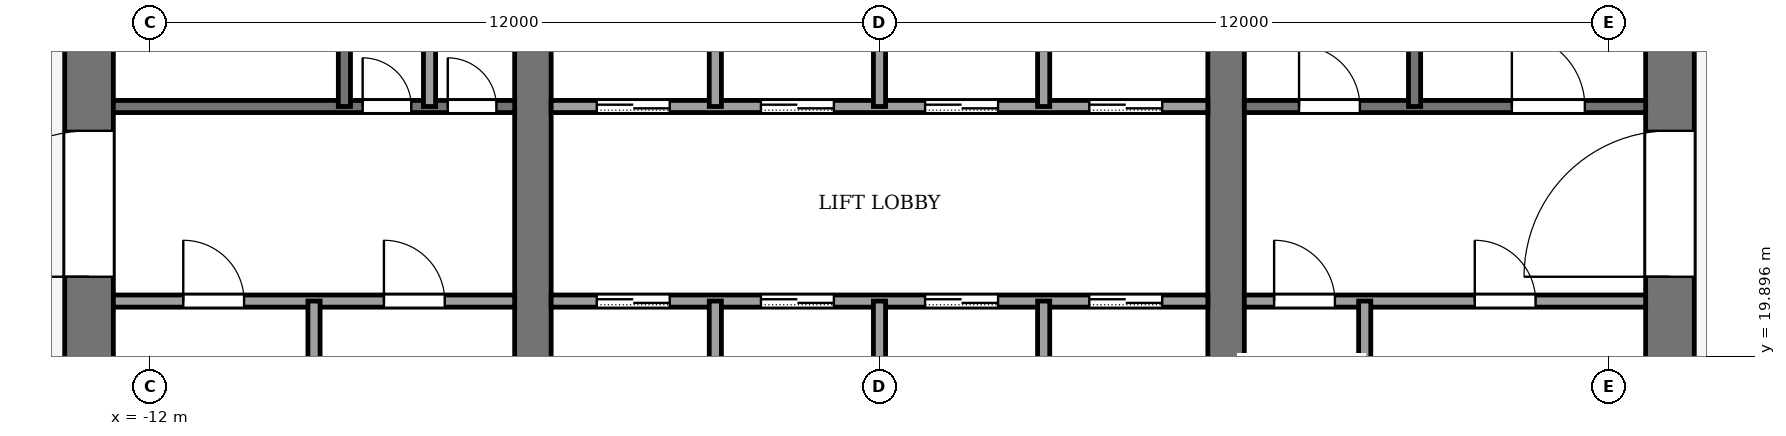
"""IFC4 building model, lengths in metres.
Left out: names, types, materials, properties, quantities, classifications, styles, units other than length and angle.
Written with IfcOpenShell. Run it as: python <this file> out.ifc"""

import sys

from ifc_helpers import new_model, si_unit, direction, frame, frame_2d, origin, place, context, subcontext, project, spatial, rectangle, extrude, element, fill, save


model = new_model("IFC4")
c1 = context("Model", 3, precision=1e-05, world=origin(), true_north=direction((0.0, 1.0)))
c2 = subcontext(c1, "Body", "Model", "MODEL_VIEW")
j1 = project(units=[si_unit("LENGTHUNIT", "METRE"), si_unit("PLANEANGLEUNIT", "RADIAN")], contexts=[c1])
p1 = place(None, origin())
s1 = spatial("IfcSite", under=j1, at=p1, CompositionType="ELEMENT")
p2 = place(p1, origin())
s2 = spatial("IfcBuilding", under=s1, at=p2, CompositionType="ELEMENT")
p3 = place(p2, frame((0.0, 0.0, 242.0)))
s3 = spatial("IfcBuildingStorey", under=s2, at=p3, CompositionType="ELEMENT", Elevation=242.0)
p4 = place(p3, frame((-13.0, 18.4, -0.13), z_axis=(0.0, 0.0, 1.0), x_axis=(0.0, 1.0, 0.0)))
e1 = element("IfcWall", 1, at=p4, inside=s3, PredefinedType="SHEAR", context=c2, shape_type="SweptSolid", body=[
    extrude(rectangle(XDim=19.2, YDim=0.8, at=frame_2d((9.6, 0.0))), origin(), (0.0, 0.0, 1.0), 4.0),
])
p5 = place(p4, frame((2.8, 0.0, 0.13)))
e2 = element("IfcOpeningElement", 2, at=p5, cuts=e1, PredefinedType="OPENING", context=c2, shape_type="SweptSolid", body=[
    extrude(rectangle(XDim=2.4, YDim=2.4, at=frame_2d((1.2, 1.2))), frame((0.0, 0.41, 0.0), z_axis=(0.0, -1.0, 0.0), x_axis=(1.0, 0.0, 0.0)), (0.0, 0.0, 1.0), 0.82),
])
p6 = place(p4, frame((13.4, 0.0, 0.13)))
e3 = element("IfcOpeningElement", 3, at=p6, cuts=e1, PredefinedType="OPENING", context=c2, shape_type="SweptSolid", body=[
    extrude(rectangle(XDim=1.4, YDim=2.2, at=frame_2d((0.7, 1.1))), frame((0.0, 0.41, 0.0), z_axis=(0.0, -1.0, 0.0), x_axis=(1.0, 0.0, 0.0)), (0.0, 0.0, 1.0), 0.82),
])
p7 = place(p3, frame((13.0, 18.4, -0.13), z_axis=(0.0, 0.0, 1.0), x_axis=(0.0, 1.0, 0.0)))
e4 = element("IfcWall", 4, at=p7, inside=s3, PredefinedType="SHEAR", context=c2, shape_type="SweptSolid", body=[
    extrude(rectangle(XDim=19.2, YDim=0.8, at=frame_2d((9.6, 0.0))), origin(), (0.0, 0.0, 1.0), 4.0),
])
p8 = place(p7, frame((2.8, 0.0, 0.13)))
e5 = element("IfcOpeningElement", 5, at=p8, cuts=e4, PredefinedType="OPENING", context=c2, shape_type="SweptSolid", body=[
    extrude(rectangle(XDim=2.4, YDim=2.4, at=frame_2d((1.2, 1.2))), frame((0.0, 0.41, 0.0), z_axis=(0.0, -1.0, 0.0), x_axis=(1.0, 0.0, 0.0)), (0.0, 0.0, 1.0), 0.82),
])
p9 = place(p7, frame((13.3, 0.0, 0.13)))
e6 = element("IfcOpeningElement", 6, at=p9, cuts=e4, PredefinedType="OPENING", context=c2, shape_type="SweptSolid", body=[
    extrude(rectangle(XDim=2.4, YDim=2.4, at=frame_2d((1.2, 1.2))), frame((0.0, 0.41, 0.0), z_axis=(0.0, -1.0, 0.0), x_axis=(1.0, 0.0, 0.0)), (0.0, 0.0, 1.0), 0.82),
])
p10 = place(p3, frame((-5.7, 18.4, -0.13), z_axis=(0.0, 0.0, 1.0), x_axis=(0.0, 1.0, 0.0)))
e7 = element("IfcWall", 7, at=p10, inside=s3, PredefinedType="SHEAR", context=c2, shape_type="SweptSolid", body=[
    extrude(rectangle(XDim=19.2, YDim=0.6, at=frame_2d((9.6, 0.0))), origin(), (0.0, 0.0, 1.0), 4.0),
])
p11 = place(p10, frame((8.35, 0.0, 0.13)))
e8 = element("IfcOpeningElement", 8, at=p11, cuts=e7, PredefinedType="OPENING", context=c2, shape_type="SweptSolid", body=[
    extrude(rectangle(XDim=0.9, YDim=2.1, at=frame_2d((0.45, 1.05))), frame((0.0, 0.31, 0.0), z_axis=(0.0, -1.0, 0.0), x_axis=(1.0, 0.0, 0.0)), (0.0, 0.0, 1.0), 0.62),
])
p12 = place(p3, frame((5.7, 18.4, -0.13), z_axis=(0.0, 0.0, 1.0), x_axis=(0.0, 1.0, 0.0)))
e9 = element("IfcWall", 9, at=p12, inside=s3, PredefinedType="SHEAR", context=c2, shape_type="SweptSolid", body=[
    extrude(rectangle(XDim=19.2, YDim=0.6, at=frame_2d((9.6, 0.0))), origin(), (0.0, 0.0, 1.0), 4.0),
])
p13 = place(p12, frame((8.35, 0.0, 0.13)))
e10 = element("IfcOpeningElement", 10, at=p13, cuts=e9, PredefinedType="OPENING", context=c2, shape_type="SweptSolid", body=[
    extrude(rectangle(XDim=0.9, YDim=2.1, at=frame_2d((0.45, 1.05))), frame((0.0, 0.31, 0.0), z_axis=(0.0, -1.0, 0.0), x_axis=(1.0, 0.0, 0.0)), (0.0, 0.0, 1.0), 0.62),
])
p14 = place(p12, frame((13.3, 0.0, 0.13)))
e11 = element("IfcOpeningElement", 11, at=p14, cuts=e9, PredefinedType="OPENING", context=c2, shape_type="SweptSolid", body=[
    extrude(rectangle(XDim=2.4, YDim=2.4, at=frame_2d((1.2, 1.2))), frame((0.0, 0.31, 0.0), z_axis=(0.0, -1.0, 0.0), x_axis=(1.0, 0.0, 0.0)), (0.0, 0.0, 1.0), 0.62),
])
p15 = place(p3, frame((-12.6, 20.8, 0.0), z_axis=(0.0, 0.0, 1.0), x_axis=(1.0, 0.0, 0.0)))
e12 = element("IfcWall", 12, at=p15, inside=s3, PredefinedType="PARTITIONING", context=c2, shape_type="SweptSolid", body=[
    extrude(rectangle(XDim=6.6, YDim=0.2, at=frame_2d((3.3, 0.0))), origin(), (0.0, 0.0, 1.0), 3.87),
])
p16 = place(p15, frame((1.15, 0.0, 0.0)))
e13 = element("IfcOpeningElement", 13, at=p16, cuts=e12, PredefinedType="OPENING", context=c2, shape_type="SweptSolid", body=[
    extrude(rectangle(XDim=1.0, YDim=2.1, at=frame_2d((0.5, 1.05))), frame((0.0, 0.11, 0.0), z_axis=(0.0, -1.0, 0.0), x_axis=(1.0, 0.0, 0.0)), (0.0, 0.0, 1.0), 0.22),
])
p17 = place(p15, frame((4.45, 0.0, 0.0)))
e14 = element("IfcOpeningElement", 14, at=p17, cuts=e12, PredefinedType="OPENING", context=c2, shape_type="SweptSolid", body=[
    extrude(rectangle(XDim=1.0, YDim=2.1, at=frame_2d((0.5, 1.05))), frame((0.0, 0.11, 0.0), z_axis=(0.0, -1.0, 0.0), x_axis=(1.0, 0.0, 0.0)), (0.0, 0.0, 1.0), 0.22),
])
p18 = place(p3, frame((-5.4, 20.8, 0.0), z_axis=(0.0, 0.0, 1.0), x_axis=(1.0, 0.0, 0.0)))
e15 = element("IfcWall", 15, at=p18, inside=s3, PredefinedType="PARTITIONING", context=c2, shape_type="SweptSolid", body=[
    extrude(rectangle(XDim=10.8, YDim=0.2, at=frame_2d((5.4, 0.0))), origin(), (0.0, 0.0, 1.0), 3.87),
])
p19 = place(p18, frame((0.75, 0.0, 0.0)))
e16 = element("IfcOpeningElement", 16, at=p19, cuts=e15, PredefinedType="OPENING", context=c2, shape_type="SweptSolid", body=[
    extrude(rectangle(XDim=1.2, YDim=2.2, at=frame_2d((0.6, 1.1))), frame((0.0, 0.11, 0.0), z_axis=(0.0, -1.0, 0.0), x_axis=(1.0, 0.0, 0.0)), (0.0, 0.0, 1.0), 0.22),
])
p20 = place(p18, frame((3.45, 0.0, 0.0)))
e17 = element("IfcOpeningElement", 17, at=p20, cuts=e15, PredefinedType="OPENING", context=c2, shape_type="SweptSolid", body=[
    extrude(rectangle(XDim=1.2, YDim=2.2, at=frame_2d((0.6, 1.1))), frame((0.0, 0.11, 0.0), z_axis=(0.0, -1.0, 0.0), x_axis=(1.0, 0.0, 0.0)), (0.0, 0.0, 1.0), 0.22),
])
p21 = place(p18, frame((6.15, 0.0, 0.0)))
e18 = element("IfcOpeningElement", 18, at=p21, cuts=e15, PredefinedType="OPENING", context=c2, shape_type="SweptSolid", body=[
    extrude(rectangle(XDim=1.2, YDim=2.2, at=frame_2d((0.6, 1.1))), frame((0.0, 0.11, 0.0), z_axis=(0.0, -1.0, 0.0), x_axis=(1.0, 0.0, 0.0)), (0.0, 0.0, 1.0), 0.22),
])
p22 = place(p18, frame((8.85, 0.0, 0.0)))
e19 = element("IfcOpeningElement", 19, at=p22, cuts=e15, PredefinedType="OPENING", context=c2, shape_type="SweptSolid", body=[
    extrude(rectangle(XDim=1.2, YDim=2.2, at=frame_2d((0.6, 1.1))), frame((0.0, 0.11, 0.0), z_axis=(0.0, -1.0, 0.0), x_axis=(1.0, 0.0, 0.0)), (0.0, 0.0, 1.0), 0.22),
])
p23 = place(p3, frame((6.0, 20.8, 0.0), z_axis=(0.0, 0.0, 1.0), x_axis=(1.0, 0.0, 0.0)))
e20 = element("IfcWall", 20, at=p23, inside=s3, PredefinedType="PARTITIONING", context=c2, shape_type="SweptSolid", body=[
    extrude(rectangle(XDim=6.6, YDim=0.2, at=frame_2d((3.3, 0.0))), origin(), (0.0, 0.0, 1.0), 3.87),
])
p24 = place(p23, frame((0.49, 0.0, 0.0)))
e21 = element("IfcOpeningElement", 21, at=p24, cuts=e20, PredefinedType="OPENING", context=c2, shape_type="SweptSolid", body=[
    extrude(rectangle(XDim=1.0, YDim=2.1, at=frame_2d((0.5, 1.05))), frame((0.0, 0.11, 0.0), z_axis=(0.0, -1.0, 0.0), x_axis=(1.0, 0.0, 0.0)), (0.0, 0.0, 1.0), 0.22),
])
p25 = place(p23, frame((3.79, 0.0, 0.0)))
e22 = element("IfcOpeningElement", 22, at=p25, cuts=e20, PredefinedType="OPENING", context=c2, shape_type="SweptSolid", body=[
    extrude(rectangle(XDim=1.0, YDim=2.1, at=frame_2d((0.5, 1.05))), frame((0.0, 0.11, 0.0), z_axis=(0.0, -1.0, 0.0), x_axis=(1.0, 0.0, 0.0)), (0.0, 0.0, 1.0), 0.22),
])
p26 = place(p3, frame((-12.6, 24.0, 0.0), z_axis=(0.0, 0.0, 1.0), x_axis=(1.0, 0.0, 0.0)))
e23 = element("IfcWall", 23, at=p26, inside=s3, PredefinedType="PARTITIONING", context=c2, shape_type="SweptSolid", body=[
    extrude(rectangle(XDim=6.6, YDim=0.2, at=frame_2d((3.3, 0.0))), origin(), (0.0, 0.0, 1.0), 3.87),
])
p27 = place(p26, frame((4.1, 0.0, 0.0)))
e24 = element("IfcOpeningElement", 24, at=p27, cuts=e23, PredefinedType="OPENING", context=c2, shape_type="SweptSolid", body=[
    extrude(rectangle(XDim=0.8, YDim=2.1, at=frame_2d((0.4, 1.05))), frame((0.0, 0.11, 0.0), z_axis=(0.0, -1.0, 0.0), x_axis=(1.0, 0.0, 0.0)), (0.0, 0.0, 1.0), 0.22),
])
p28 = place(p26, frame((5.5, 0.0, 0.0)))
e25 = element("IfcOpeningElement", 25, at=p28, cuts=e23, PredefinedType="OPENING", context=c2, shape_type="SweptSolid", body=[
    extrude(rectangle(XDim=0.8, YDim=2.1, at=frame_2d((0.4, 1.05))), frame((0.0, 0.11, 0.0), z_axis=(0.0, -1.0, 0.0), x_axis=(1.0, 0.0, 0.0)), (0.0, 0.0, 1.0), 0.22),
])
p29 = place(p3, frame((-5.4, 24.0, 0.0), z_axis=(0.0, 0.0, 1.0), x_axis=(1.0, 0.0, 0.0)))
e26 = element("IfcWall", 26, at=p29, inside=s3, PredefinedType="PARTITIONING", context=c2, shape_type="SweptSolid", body=[
    extrude(rectangle(XDim=10.8, YDim=0.2, at=frame_2d((5.4, 0.0))), origin(), (0.0, 0.0, 1.0), 3.87),
])
p30 = place(p29, frame((0.75, 0.0, 0.0)))
e27 = element("IfcOpeningElement", 27, at=p30, cuts=e26, PredefinedType="OPENING", context=c2, shape_type="SweptSolid", body=[
    extrude(rectangle(XDim=1.2, YDim=2.2, at=frame_2d((0.6, 1.1))), frame((0.0, 0.11, 0.0), z_axis=(0.0, -1.0, 0.0), x_axis=(1.0, 0.0, 0.0)), (0.0, 0.0, 1.0), 0.22),
])
p31 = place(p29, frame((3.45, 0.0, 0.0)))
e28 = element("IfcOpeningElement", 28, at=p31, cuts=e26, PredefinedType="OPENING", context=c2, shape_type="SweptSolid", body=[
    extrude(rectangle(XDim=1.2, YDim=2.2, at=frame_2d((0.6, 1.1))), frame((0.0, 0.11, 0.0), z_axis=(0.0, -1.0, 0.0), x_axis=(1.0, 0.0, 0.0)), (0.0, 0.0, 1.0), 0.22),
])
p32 = place(p29, frame((6.15, 0.0, 0.0)))
e29 = element("IfcOpeningElement", 29, at=p32, cuts=e26, PredefinedType="OPENING", context=c2, shape_type="SweptSolid", body=[
    extrude(rectangle(XDim=1.2, YDim=2.2, at=frame_2d((0.6, 1.1))), frame((0.0, 0.11, 0.0), z_axis=(0.0, -1.0, 0.0), x_axis=(1.0, 0.0, 0.0)), (0.0, 0.0, 1.0), 0.22),
])
p33 = place(p29, frame((8.85, 0.0, 0.0)))
e30 = element("IfcOpeningElement", 30, at=p33, cuts=e26, PredefinedType="OPENING", context=c2, shape_type="SweptSolid", body=[
    extrude(rectangle(XDim=1.2, YDim=2.2, at=frame_2d((0.6, 1.1))), frame((0.0, 0.11, 0.0), z_axis=(0.0, -1.0, 0.0), x_axis=(1.0, 0.0, 0.0)), (0.0, 0.0, 1.0), 0.22),
])
p34 = place(p3, frame((6.0, 24.0, 0.0), z_axis=(0.0, 0.0, 1.0), x_axis=(1.0, 0.0, 0.0)))
e31 = element("IfcWall", 31, at=p34, inside=s3, PredefinedType="PARTITIONING", context=c2, shape_type="SweptSolid", body=[
    extrude(rectangle(XDim=6.6, YDim=0.2, at=frame_2d((3.3, 0.0))), origin(), (0.0, 0.0, 1.0), 3.87),
])
p35 = place(p34, frame((0.9, 0.0, 0.0)))
e32 = element("IfcOpeningElement", 32, at=p35, cuts=e31, PredefinedType="OPENING", context=c2, shape_type="SweptSolid", body=[
    extrude(rectangle(XDim=1.0, YDim=2.1, at=frame_2d((0.5, 1.05))), frame((0.0, 0.11, 0.0), z_axis=(0.0, -1.0, 0.0), x_axis=(1.0, 0.0, 0.0)), (0.0, 0.0, 1.0), 0.22),
])
p36 = place(p34, frame((4.4, 0.0, 0.0)))
e33 = element("IfcOpeningElement", 33, at=p36, cuts=e31, PredefinedType="OPENING", context=c2, shape_type="SweptSolid", body=[
    extrude(rectangle(XDim=1.2, YDim=2.2, at=frame_2d((0.6, 1.1))), frame((0.0, 0.11, 0.0), z_axis=(0.0, -1.0, 0.0), x_axis=(1.0, 0.0, 0.0)), (0.0, 0.0, 1.0), 0.22),
])
p37 = place(p3, frame((-9.3, 18.4, 0.0), z_axis=(0.0, 0.0, 1.0), x_axis=(0.0, 1.0, 0.0)))
e34 = element("IfcWall", 34, at=p37, inside=s3, PredefinedType="PARTITIONING", context=c2, shape_type="SweptSolid", body=[
    extrude(rectangle(XDim=2.4, YDim=0.2, at=frame_2d((1.2, 0.0))), origin(), (0.0, 0.0, 1.0), 3.87),
])
for number, where, z_axis, x_axis in (
    (35, (-8.8, 24.0, 0.0), (0.0, 0.0, 1.0), (0.0, 1.0, 0.0)),
    (36, (-7.4, 24.0, 0.0), (0.0, 0.0, 1.0), (0.0, 1.0, 0.0)),
):
    element("IfcWall", number, at=place(p3, frame(where, z_axis=z_axis, x_axis=x_axis)), inside=s3, PredefinedType="PARTITIONING", context=c2, shape_type="SweptSolid", body=[
        extrude(rectangle(XDim=7.4, YDim=0.2, at=frame_2d((3.7, 0.0))), origin(), (0.0, 0.0, 1.0), 3.87),
    ])
p38 = place(p3, frame((-2.7, 18.4, 0.0), z_axis=(0.0, 0.0, 1.0), x_axis=(0.0, 1.0, 0.0)))
e37 = element("IfcWall", 37, at=p38, inside=s3, PredefinedType="PARTITIONING", context=c2, shape_type="SweptSolid", body=[
    extrude(rectangle(XDim=2.4, YDim=0.2, at=frame_2d((1.2, 0.0))), origin(), (0.0, 0.0, 1.0), 3.87),
])
p39 = place(p3, frame((-2.7, 24.0, 0.0), z_axis=(0.0, 0.0, 1.0), x_axis=(0.0, 1.0, 0.0)))
e38 = element("IfcWall", 38, at=p39, inside=s3, PredefinedType="PARTITIONING", context=c2, shape_type="SweptSolid", body=[
    extrude(rectangle(XDim=2.4, YDim=0.2, at=frame_2d((1.2, 0.0))), origin(), (0.0, 0.0, 1.0), 3.87),
])
p40 = place(p3, frame((0.0, 18.4, 0.0), z_axis=(0.0, 0.0, 1.0), x_axis=(0.0, 1.0, 0.0)))
e39 = element("IfcWall", 39, at=p40, inside=s3, PredefinedType="PARTITIONING", context=c2, shape_type="SweptSolid", body=[
    extrude(rectangle(XDim=2.4, YDim=0.2, at=frame_2d((1.2, 0.0))), origin(), (0.0, 0.0, 1.0), 3.87),
])
p41 = place(p3, frame((0.0, 24.0, 0.0), z_axis=(0.0, 0.0, 1.0), x_axis=(0.0, 1.0, 0.0)))
e40 = element("IfcWall", 40, at=p41, inside=s3, PredefinedType="PARTITIONING", context=c2, shape_type="SweptSolid", body=[
    extrude(rectangle(XDim=4.0, YDim=0.2, at=frame_2d((2.0, 0.0))), origin(), (0.0, 0.0, 1.0), 3.87),
])
p42 = place(p3, frame((2.7, 18.4, 0.0), z_axis=(0.0, 0.0, 1.0), x_axis=(0.0, 1.0, 0.0)))
e41 = element("IfcWall", 41, at=p42, inside=s3, PredefinedType="PARTITIONING", context=c2, shape_type="SweptSolid", body=[
    extrude(rectangle(XDim=2.4, YDim=0.2, at=frame_2d((1.2, 0.0))), origin(), (0.0, 0.0, 1.0), 3.87),
])
p43 = place(p3, frame((2.7, 24.0, 0.0), z_axis=(0.0, 0.0, 1.0), x_axis=(0.0, 1.0, 0.0)))
e42 = element("IfcWall", 42, at=p43, inside=s3, PredefinedType="PARTITIONING", context=c2, shape_type="SweptSolid", body=[
    extrude(rectangle(XDim=2.4, YDim=0.2, at=frame_2d((1.2, 0.0))), origin(), (0.0, 0.0, 1.0), 3.87),
])
p44 = place(p3, frame((7.98, 18.4, 0.0), z_axis=(0.0, 0.0, 1.0), x_axis=(0.0, 1.0, 0.0)))
e43 = element("IfcWall", 43, at=p44, inside=s3, PredefinedType="PARTITIONING", context=c2, shape_type="SweptSolid", body=[
    extrude(rectangle(XDim=2.4, YDim=0.2, at=frame_2d((1.2, 0.0))), origin(), (0.0, 0.0, 1.0), 3.87),
])
p45 = place(p3, frame((8.8, 24.0, 0.0), z_axis=(0.0, 0.0, 1.0), x_axis=(0.0, 1.0, 0.0)))
e44 = element("IfcWall", 44, at=p45, inside=s3, PredefinedType="PARTITIONING", context=c2, shape_type="SweptSolid", body=[
    extrude(rectangle(XDim=7.4, YDim=0.2, at=frame_2d((3.7, 0.0))), origin(), (0.0, 0.0, 1.0), 3.87),
])
p46 = place(p19, origin())
e45 = element("IfcDoor", 45, at=p46, inside=s3, OperationType="SLIDING_TO_LEFT", PredefinedType="DOOR", context=c2, shape_type="SweptSolid", body=[
    extrude(rectangle(XDim=1.2, YDim=2.2, at=frame_2d((0.6, 1.1))), frame((0.0, 0.025, 0.0), z_axis=(0.0, -1.0, 0.0), x_axis=(1.0, 0.0, 0.0)), (0.0, 0.0, 1.0), 0.05),
])
fill(e16, e45)
p47 = place(p20, origin())
e46 = element("IfcDoor", 46, at=p47, inside=s3, OperationType="SLIDING_TO_LEFT", PredefinedType="DOOR", context=c2, shape_type="SweptSolid", body=[
    extrude(rectangle(XDim=1.2, YDim=2.2, at=frame_2d((0.6, 1.1))), frame((0.0, 0.025, 0.0), z_axis=(0.0, -1.0, 0.0), x_axis=(1.0, 0.0, 0.0)), (0.0, 0.0, 1.0), 0.05),
])
fill(e17, e46)
p48 = place(p21, origin())
e47 = element("IfcDoor", 47, at=p48, inside=s3, OperationType="SLIDING_TO_LEFT", PredefinedType="DOOR", context=c2, shape_type="SweptSolid", body=[
    extrude(rectangle(XDim=1.2, YDim=2.2, at=frame_2d((0.6, 1.1))), frame((0.0, 0.025, 0.0), z_axis=(0.0, -1.0, 0.0), x_axis=(1.0, 0.0, 0.0)), (0.0, 0.0, 1.0), 0.05),
])
fill(e18, e47)
p49 = place(p22, origin())
e48 = element("IfcDoor", 48, at=p49, inside=s3, OperationType="SLIDING_TO_LEFT", PredefinedType="DOOR", context=c2, shape_type="SweptSolid", body=[
    extrude(rectangle(XDim=1.2, YDim=2.2, at=frame_2d((0.6, 1.1))), frame((0.0, 0.025, 0.0), z_axis=(0.0, -1.0, 0.0), x_axis=(1.0, 0.0, 0.0)), (0.0, 0.0, 1.0), 0.05),
])
fill(e19, e48)
p50 = place(p30, origin())
e49 = element("IfcDoor", 49, at=p50, inside=s3, OperationType="SLIDING_TO_LEFT", PredefinedType="DOOR", context=c2, shape_type="SweptSolid", body=[
    extrude(rectangle(XDim=1.2, YDim=2.2, at=frame_2d((0.6, 1.1))), frame((0.0, 0.025, 0.0), z_axis=(0.0, -1.0, 0.0), x_axis=(1.0, 0.0, 0.0)), (0.0, 0.0, 1.0), 0.05),
])
fill(e27, e49)
p51 = place(p31, origin())
e50 = element("IfcDoor", 50, at=p51, inside=s3, OperationType="SLIDING_TO_LEFT", PredefinedType="DOOR", context=c2, shape_type="SweptSolid", body=[
    extrude(rectangle(XDim=1.2, YDim=2.2, at=frame_2d((0.6, 1.1))), frame((0.0, 0.025, 0.0), z_axis=(0.0, -1.0, 0.0), x_axis=(1.0, 0.0, 0.0)), (0.0, 0.0, 1.0), 0.05),
])
fill(e28, e50)
p52 = place(p32, origin())
e51 = element("IfcDoor", 51, at=p52, inside=s3, OperationType="SLIDING_TO_LEFT", PredefinedType="DOOR", context=c2, shape_type="SweptSolid", body=[
    extrude(rectangle(XDim=1.2, YDim=2.2, at=frame_2d((0.6, 1.1))), frame((0.0, 0.025, 0.0), z_axis=(0.0, -1.0, 0.0), x_axis=(1.0, 0.0, 0.0)), (0.0, 0.0, 1.0), 0.05),
])
fill(e29, e51)
p53 = place(p33, origin())
e52 = element("IfcDoor", 52, at=p53, inside=s3, OperationType="SLIDING_TO_LEFT", PredefinedType="DOOR", context=c2, shape_type="SweptSolid", body=[
    extrude(rectangle(XDim=1.2, YDim=2.2, at=frame_2d((0.6, 1.1))), frame((0.0, 0.025, 0.0), z_axis=(0.0, -1.0, 0.0), x_axis=(1.0, 0.0, 0.0)), (0.0, 0.0, 1.0), 0.05),
])
fill(e30, e52)
p54 = place(p16, origin())
e53 = element("IfcDoor", 53, at=p54, inside=s3, OperationType="SINGLE_SWING_LEFT", PredefinedType="DOOR", context=c2, shape_type="SweptSolid", body=[
    extrude(rectangle(XDim=1.0, YDim=2.1, at=frame_2d((0.5, 1.05))), frame((0.0, 0.025, 0.0), z_axis=(0.0, -1.0, 0.0), x_axis=(1.0, 0.0, 0.0)), (0.0, 0.0, 1.0), 0.05),
])
fill(e13, e53)
p55 = place(p17, origin())
e54 = element("IfcDoor", 54, at=p55, inside=s3, OperationType="SINGLE_SWING_LEFT", PredefinedType="DOOR", context=c2, shape_type="SweptSolid", body=[
    extrude(rectangle(XDim=1.0, YDim=2.1, at=frame_2d((0.5, 1.05))), frame((0.0, 0.025, 0.0), z_axis=(0.0, -1.0, 0.0), x_axis=(1.0, 0.0, 0.0)), (0.0, 0.0, 1.0), 0.05),
])
fill(e14, e54)
p56 = place(p24, origin())
e55 = element("IfcDoor", 55, at=p56, inside=s3, OperationType="SINGLE_SWING_RIGHT", PredefinedType="DOOR", context=c2, shape_type="SweptSolid", body=[
    extrude(rectangle(XDim=1.0, YDim=2.1, at=frame_2d((0.5, 1.05))), frame((0.0, 0.025, 0.0), z_axis=(0.0, -1.0, 0.0), x_axis=(1.0, 0.0, 0.0)), (0.0, 0.0, 1.0), 0.05),
])
fill(e21, e55)
p57 = place(p25, origin())
e56 = element("IfcDoor", 56, at=p57, inside=s3, OperationType="SINGLE_SWING_RIGHT", PredefinedType="DOOR", context=c2, shape_type="SweptSolid", body=[
    extrude(rectangle(XDim=1.0, YDim=2.1, at=frame_2d((0.5, 1.05))), frame((0.0, 0.025, 0.0), z_axis=(0.0, -1.0, 0.0), x_axis=(1.0, 0.0, 0.0)), (0.0, 0.0, 1.0), 0.05),
])
fill(e22, e56)
p58 = place(p27, origin())
e57 = element("IfcDoor", 57, at=p58, inside=s3, OperationType="SINGLE_SWING_LEFT", PredefinedType="DOOR", context=c2, shape_type="SweptSolid", body=[
    extrude(rectangle(XDim=0.8, YDim=2.1, at=frame_2d((0.4, 1.05))), frame((0.0, 0.025, 0.0), z_axis=(0.0, -1.0, 0.0), x_axis=(1.0, 0.0, 0.0)), (0.0, 0.0, 1.0), 0.05),
])
fill(e24, e57)
p59 = place(p28, origin())
e58 = element("IfcDoor", 58, at=p59, inside=s3, OperationType="SINGLE_SWING_RIGHT", PredefinedType="DOOR", context=c2, shape_type="SweptSolid", body=[
    extrude(rectangle(XDim=0.8, YDim=2.1, at=frame_2d((0.4, 1.05))), frame((0.0, 0.025, 0.0), z_axis=(0.0, -1.0, 0.0), x_axis=(1.0, 0.0, 0.0)), (0.0, 0.0, 1.0), 0.05),
])
fill(e25, e58)
p60 = place(p35, origin())
e59 = element("IfcDoor", 59, at=p60, inside=s3, OperationType="SINGLE_SWING_RIGHT", PredefinedType="DOOR", context=c2, shape_type="SweptSolid", body=[
    extrude(rectangle(XDim=1.0, YDim=2.1, at=frame_2d((0.5, 1.05))), frame((0.0, 0.025, 0.0), z_axis=(0.0, -1.0, 0.0), x_axis=(1.0, 0.0, 0.0)), (0.0, 0.0, 1.0), 0.05),
])
fill(e32, e59)
p61 = place(p36, origin())
e60 = element("IfcDoor", 60, at=p61, inside=s3, OperationType="SINGLE_SWING_LEFT", PredefinedType="DOOR", context=c2, shape_type="SweptSolid", body=[
    extrude(rectangle(XDim=1.2, YDim=2.2, at=frame_2d((0.6, 1.1))), frame((0.0, 0.025, 0.0), z_axis=(0.0, -1.0, 0.0), x_axis=(1.0, 0.0, 0.0)), (0.0, 0.0, 1.0), 0.05),
])
fill(e33, e60)
p62 = place(p5, origin())
e61 = element("IfcDoor", 61, at=p62, inside=s3, OperationType="DOUBLE_DOOR_SINGLE_SWING", PredefinedType="DOOR", context=c2, shape_type="SweptSolid", body=[
    extrude(rectangle(XDim=2.4, YDim=2.4, at=frame_2d((1.2, 1.2))), frame((0.0, 0.025, 0.0), z_axis=(0.0, -1.0, 0.0), x_axis=(1.0, 0.0, 0.0)), (0.0, 0.0, 1.0), 0.05),
])
fill(e2, e61)
p63 = place(p8, origin())
e62 = element("IfcDoor", 62, at=p63, inside=s3, OperationType="DOUBLE_DOOR_SINGLE_SWING", PredefinedType="DOOR", context=c2, shape_type="SweptSolid", body=[
    extrude(rectangle(XDim=2.4, YDim=2.4, at=frame_2d((1.2, 1.2))), frame((0.0, 0.025, 0.0), z_axis=(0.0, -1.0, 0.0), x_axis=(1.0, 0.0, 0.0)), (0.0, 0.0, 1.0), 0.05),
])
fill(e5, e62)
save(model, sys.argv[1])
